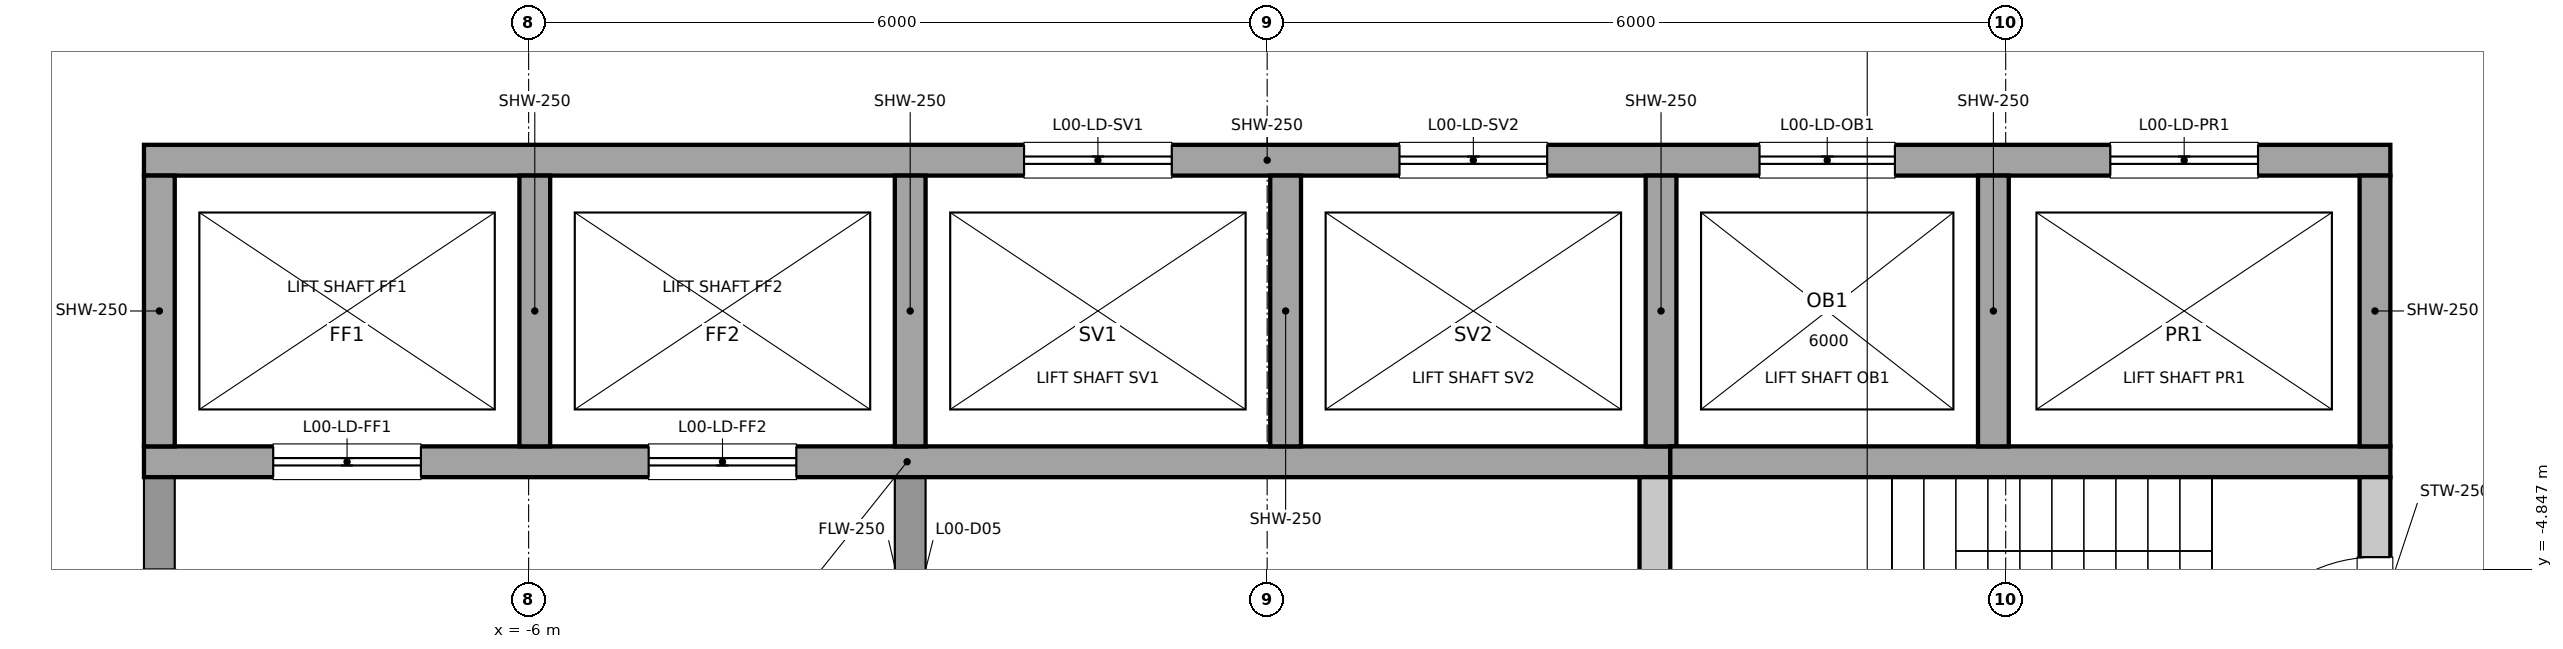
"""IFC4 building model, lengths in metres.
Left out: names, types, materials, properties, quantities, classifications, styles, units other than length and angle.
Written with IfcOpenShell. Run it as: python <this file> out.ifc"""

import sys

from ifc_helpers import new_model, si_unit, direction, frame, frame_2d, origin, place, context, subcontext, project, spatial, rectangle, extrude, element, fill, save


model = new_model("IFC4")
c1 = context("Model", 3, precision=1e-05, world=origin(), true_north=direction((0.0, 1.0)))
c2 = subcontext(c1, "Body", "Model", "MODEL_VIEW")
j1 = project(units=[si_unit("LENGTHUNIT", "METRE"), si_unit("PLANEANGLEUNIT", "RADIAN")], contexts=[c1])
p1 = place(None, origin())
s1 = spatial("IfcSite", under=j1, at=p1, CompositionType="ELEMENT")
p2 = place(p1, origin())
s2 = spatial("IfcBuilding", under=s1, at=p2, CompositionType="ELEMENT")
p3 = place(p2, origin())
s3 = spatial("IfcBuildingStorey", under=s2, at=p3, CompositionType="ELEMENT", Elevation=0.0)
p4 = place(p3, frame((9.0, -6.6, 0.0), z_axis=(0.0, 0.0, 1.0), x_axis=(0.0, 1.0, 0.0)))
e1 = element("IfcWall", 1, at=p4, inside=s3, PredefinedType="SOLIDWALL", context=c2, shape_type="SweptSolid", body=[
    extrude(rectangle(XDim=2.5, YDim=0.25, at=frame_2d((1.25, 0.0))), origin(), (0.0, 0.0, 1.0), 7.8),
])
p5 = place(p4, frame((0.65, 0.0, 0.0)))
e2 = element("IfcOpeningElement", 2, at=p5, cuts=e1, PredefinedType="OPENING", context=c2, shape_type="SweptSolid", body=[
    extrude(rectangle(XDim=1.2, YDim=2.1, at=frame_2d((0.6, 1.05))), frame((0.0, 0.125, 0.0), z_axis=(0.0, -1.0, 0.0), x_axis=(1.0, 0.0, 0.0)), (0.0, 0.0, 1.0), 0.25),
])
p6 = place(p3, frame((-9.0, -6.6, 0.0), z_axis=(0.0, 0.0, 1.0), x_axis=(0.0, 1.0, 0.0)))
e3 = element("IfcWall", 3, at=p6, inside=s3, PredefinedType="PARTITIONING", context=c2, shape_type="SweptSolid", body=[
    extrude(rectangle(XDim=2.5, YDim=0.25, at=frame_2d((1.25, 0.0))), origin(), (0.0, 0.0, 1.0), 7.8),
])
p7 = place(p6, frame((0.75, 0.0, 0.0)))
e4 = element("IfcOpeningElement", 4, at=p7, cuts=e3, PredefinedType="OPENING", context=c2, shape_type="SweptSolid", body=[
    extrude(rectangle(XDim=1.0, YDim=2.1, at=frame_2d((0.5, 1.05))), frame((0.0, 0.125, 0.0), z_axis=(0.0, -1.0, 0.0), x_axis=(1.0, 0.0, 0.0)), (0.0, 0.0, 1.0), 0.25),
])
p8 = place(p3, frame((3.15, -6.6, 0.0), z_axis=(0.0, 0.0, 1.0), x_axis=(0.0, 1.0, 0.0)))
e5 = element("IfcWall", 5, at=p8, inside=s3, PredefinedType="SOLIDWALL", context=c2, shape_type="SweptSolid", body=[
    extrude(rectangle(XDim=2.5, YDim=0.25, at=frame_2d((1.25, 0.0))), origin(), (0.0, 0.0, 1.0), 7.8),
])
p9 = place(p3, frame((-2.9, -6.6, 0.0), z_axis=(0.0, 0.0, 1.0), x_axis=(0.0, 1.0, 0.0)))
e6 = element("IfcWall", 6, at=p9, inside=s3, PredefinedType="PARTITIONING", context=c2, shape_type="SweptSolid", body=[
    extrude(rectangle(XDim=2.5, YDim=0.25, at=frame_2d((1.25, 0.0))), origin(), (0.0, 0.0, 1.0), 7.8),
])
p10 = place(p9, frame((0.8, 0.0, 0.0)))
e7 = element("IfcOpeningElement", 7, at=p10, cuts=e6, PredefinedType="OPENING", context=c2, shape_type="SweptSolid", body=[
    extrude(rectangle(XDim=0.9, YDim=2.1, at=frame_2d((0.45, 1.05))), frame((0.0, 0.125, 0.0), z_axis=(0.0, -1.0, 0.0), x_axis=(1.0, 0.0, 0.0)), (0.0, 0.0, 1.0), 0.25),
])
p11 = place(p3, frame((-9.125, -1.525, 0.0), z_axis=(0.0, 0.0, 1.0), x_axis=(1.0, 0.0, 0.0)))
e8 = element("IfcWall", 8, at=p11, inside=s3, PredefinedType="SOLIDWALL", context=c2, shape_type="SweptSolid", body=[
    extrude(rectangle(XDim=18.25, YDim=0.25, at=frame_2d((9.125, 0.0))), origin(), (0.0, 0.0, 1.0), 7.8),
])
p12 = place(p11, frame((7.15, 0.0, 0.0)))
e9 = element("IfcOpeningElement", 9, at=p12, cuts=e8, PredefinedType="OPENING", context=c2, shape_type="SweptSolid", body=[
    extrude(rectangle(XDim=1.2, YDim=2.1, at=frame_2d((0.6, 1.05))), frame((0.0, 0.125, 0.0), z_axis=(0.0, -1.0, 0.0), x_axis=(1.0, 0.0, 0.0)), (0.0, 0.0, 1.0), 0.25),
])
p13 = place(p11, frame((10.2, 0.0, 0.0)))
e10 = element("IfcOpeningElement", 10, at=p13, cuts=e8, PredefinedType="OPENING", context=c2, shape_type="SweptSolid", body=[
    extrude(rectangle(XDim=1.2, YDim=2.1, at=frame_2d((0.6, 1.05))), frame((0.0, 0.125, 0.0), z_axis=(0.0, -1.0, 0.0), x_axis=(1.0, 0.0, 0.0)), (0.0, 0.0, 1.0), 0.25),
])
p14 = place(p11, frame((13.125, 0.0, 0.0)))
e11 = element("IfcOpeningElement", 11, at=p14, cuts=e8, PredefinedType="OPENING", context=c2, shape_type="SweptSolid", body=[
    extrude(rectangle(XDim=1.1, YDim=2.1, at=frame_2d((0.55, 1.05))), frame((0.0, 0.125, 0.0), z_axis=(0.0, -1.0, 0.0), x_axis=(1.0, 0.0, 0.0)), (0.0, 0.0, 1.0), 0.25),
])
p15 = place(p11, frame((15.975, 0.0, 0.0)))
e12 = element("IfcOpeningElement", 12, at=p15, cuts=e8, PredefinedType="OPENING", context=c2, shape_type="SweptSolid", body=[
    extrude(rectangle(XDim=1.2, YDim=2.1, at=frame_2d((0.6, 1.05))), frame((0.0, 0.125, 0.0), z_axis=(0.0, -1.0, 0.0), x_axis=(1.0, 0.0, 0.0)), (0.0, 0.0, 1.0), 0.25),
])
p16 = place(p3, frame((-9.125, -3.975, 0.0), z_axis=(0.0, 0.0, 1.0), x_axis=(1.0, 0.0, 0.0)))
e13 = element("IfcWall", 13, at=p16, inside=s3, PredefinedType="SOLIDWALL", context=c2, shape_type="SweptSolid", body=[
    extrude(rectangle(XDim=12.4, YDim=0.25, at=frame_2d((6.2, 0.0))), origin(), (0.0, 0.0, 1.0), 7.8),
])
p17 = place(p16, frame((1.05, 0.0, 0.0)))
e14 = element("IfcOpeningElement", 14, at=p17, cuts=e13, PredefinedType="OPENING", context=c2, shape_type="SweptSolid", body=[
    extrude(rectangle(XDim=1.2, YDim=2.1, at=frame_2d((0.6, 1.05))), frame((0.0, 0.125, 0.0), z_axis=(0.0, -1.0, 0.0), x_axis=(1.0, 0.0, 0.0)), (0.0, 0.0, 1.0), 0.25),
])
p18 = place(p16, frame((4.1, 0.0, 0.0)))
e15 = element("IfcOpeningElement", 15, at=p18, cuts=e13, PredefinedType="OPENING", context=c2, shape_type="SweptSolid", body=[
    extrude(rectangle(XDim=1.2, YDim=2.1, at=frame_2d((0.6, 1.05))), frame((0.0, 0.125, 0.0), z_axis=(0.0, -1.0, 0.0), x_axis=(1.0, 0.0, 0.0)), (0.0, 0.0, 1.0), 0.25),
])
p19 = place(p3, frame((3.275, -3.975, 0.0), z_axis=(0.0, 0.0, 1.0), x_axis=(1.0, 0.0, 0.0)))
e16 = element("IfcWall", 16, at=p19, inside=s3, PredefinedType="SOLIDWALL", context=c2, shape_type="SweptSolid", body=[
    extrude(rectangle(XDim=5.85, YDim=0.25, at=frame_2d((2.925, 0.0))), origin(), (0.0, 0.0, 1.0), 7.8),
])
for number, where, z_axis, x_axis in (
    (17, (-9.0, -3.85, 0.0), (0.0, 0.0, 1.0), (0.0, 1.0, 0.0)),
    (18, (-5.95, -3.85, 0.0), (0.0, 0.0, 1.0), (0.0, 1.0, 0.0)),
    (19, (-2.9, -3.85, 0.0), (0.0, 0.0, 1.0), (0.0, 1.0, 0.0)),
    (20, (0.15, -3.85, 0.0), (0.0, 0.0, 1.0), (0.0, 1.0, 0.0)),
    (21, (3.2, -3.85, 0.0), (0.0, 0.0, 1.0), (0.0, 1.0, 0.0)),
    (22, (5.9, -3.85, 0.0), (0.0, 0.0, 1.0), (0.0, 1.0, 0.0)),
    (23, (9.0, -3.85, 0.0), (0.0, 0.0, 1.0), (0.0, 1.0, 0.0)),
):
    element("IfcWall", number, at=place(p3, frame(where, z_axis=z_axis, x_axis=x_axis)), inside=s3, PredefinedType="SOLIDWALL", context=c2, shape_type="SweptSolid", body=[
        extrude(rectangle(XDim=2.2, YDim=0.25, at=frame_2d((1.1, 0.0))), origin(), (0.0, 0.0, 1.0), 7.8),
    ])
p20 = place(p17, origin())
e24 = element("IfcDoor", 24, at=p20, inside=s3, OperationType="DOUBLE_DOOR_SLIDING", PredefinedType="DOOR", context=c2, shape_type="SweptSolid", body=[
    extrude(rectangle(XDim=1.2, YDim=2.1, at=frame_2d((0.6, 1.05))), frame((0.0, 0.025, 0.0), z_axis=(0.0, -1.0, 0.0), x_axis=(1.0, 0.0, 0.0)), (0.0, 0.0, 1.0), 0.05),
])
fill(e14, e24)
p21 = place(p18, origin())
e25 = element("IfcDoor", 25, at=p21, inside=s3, OperationType="DOUBLE_DOOR_SLIDING", PredefinedType="DOOR", context=c2, shape_type="SweptSolid", body=[
    extrude(rectangle(XDim=1.2, YDim=2.1, at=frame_2d((0.6, 1.05))), frame((0.0, 0.025, 0.0), z_axis=(0.0, -1.0, 0.0), x_axis=(1.0, 0.0, 0.0)), (0.0, 0.0, 1.0), 0.05),
])
fill(e15, e25)
p22 = place(p12, origin())
e26 = element("IfcDoor", 26, at=p22, inside=s3, OperationType="DOUBLE_DOOR_SLIDING", PredefinedType="DOOR", context=c2, shape_type="SweptSolid", body=[
    extrude(rectangle(XDim=1.2, YDim=2.1, at=frame_2d((0.6, 1.05))), frame((0.0, 0.025, 0.0), z_axis=(0.0, -1.0, 0.0), x_axis=(1.0, 0.0, 0.0)), (0.0, 0.0, 1.0), 0.05),
])
fill(e9, e26)
p23 = place(p13, origin())
e27 = element("IfcDoor", 27, at=p23, inside=s3, OperationType="DOUBLE_DOOR_SLIDING", PredefinedType="DOOR", context=c2, shape_type="SweptSolid", body=[
    extrude(rectangle(XDim=1.2, YDim=2.1, at=frame_2d((0.6, 1.05))), frame((0.0, 0.025, 0.0), z_axis=(0.0, -1.0, 0.0), x_axis=(1.0, 0.0, 0.0)), (0.0, 0.0, 1.0), 0.05),
])
fill(e10, e27)
p24 = place(p14, origin())
e28 = element("IfcDoor", 28, at=p24, inside=s3, OperationType="DOUBLE_DOOR_SLIDING", PredefinedType="DOOR", context=c2, shape_type="SweptSolid", body=[
    extrude(rectangle(XDim=1.1, YDim=2.1, at=frame_2d((0.55, 1.05))), frame((0.0, 0.025, 0.0), z_axis=(0.0, -1.0, 0.0), x_axis=(1.0, 0.0, 0.0)), (0.0, 0.0, 1.0), 0.05),
])
fill(e11, e28)
p25 = place(p15, origin())
e29 = element("IfcDoor", 29, at=p25, inside=s3, OperationType="DOUBLE_DOOR_SLIDING", PredefinedType="DOOR", context=c2, shape_type="SweptSolid", body=[
    extrude(rectangle(XDim=1.2, YDim=2.1, at=frame_2d((0.6, 1.05))), frame((0.0, 0.025, 0.0), z_axis=(0.0, -1.0, 0.0), x_axis=(1.0, 0.0, 0.0)), (0.0, 0.0, 1.0), 0.05),
])
fill(e12, e29)
p26 = place(p5, origin())
e30 = element("IfcDoor", 30, at=p26, inside=s3, OperationType="SINGLE_SWING_LEFT", PredefinedType="DOOR", context=c2, shape_type="SweptSolid", body=[
    extrude(rectangle(XDim=1.2, YDim=2.1, at=frame_2d((0.6, 1.05))), frame((0.0, 0.025, 0.0), z_axis=(0.0, -1.0, 0.0), x_axis=(1.0, 0.0, 0.0)), (0.0, 0.0, 1.0), 0.05),
])
fill(e2, e30)
save(model, sys.argv[1])
